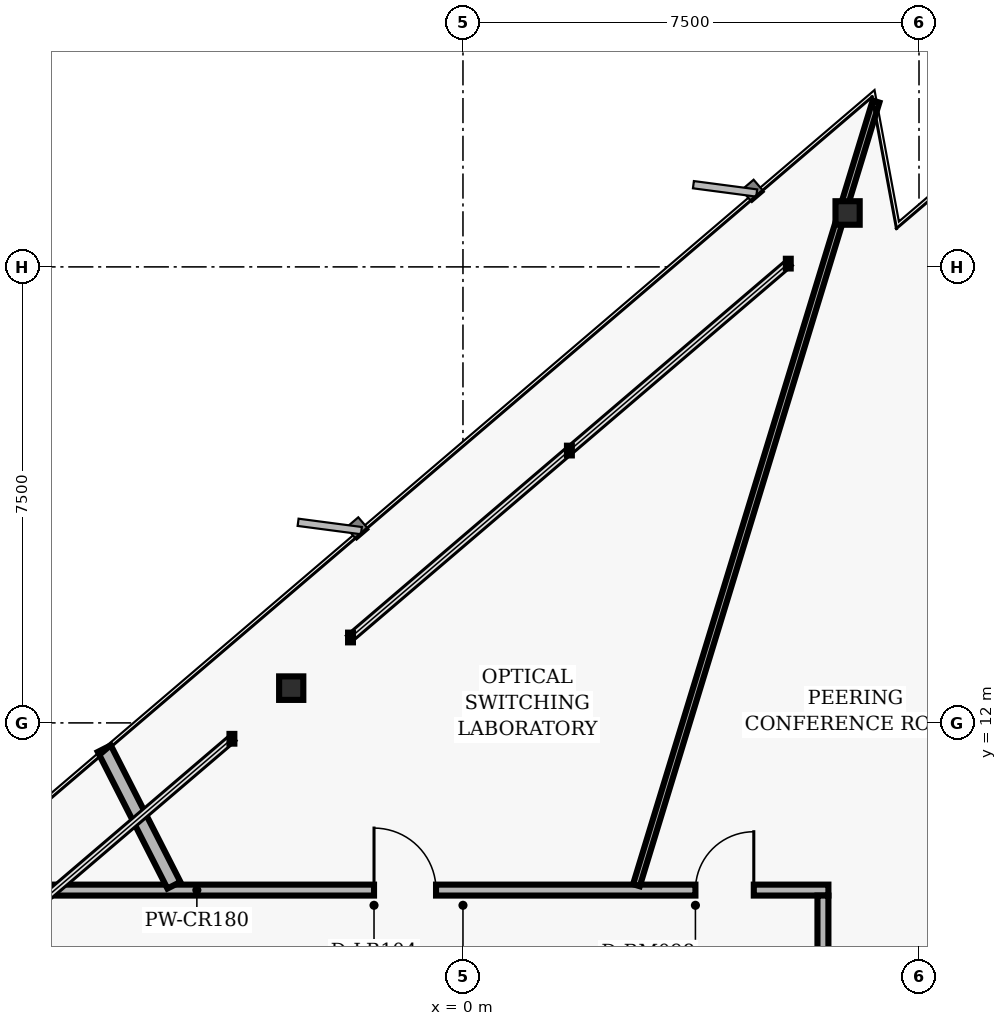
"""IFC4 building model, lengths in metres.
Left out: names, types, materials, properties, quantities, classifications, styles, units other than length and angle.
Written with IfcOpenShell. Run it as: python <this file> out.ifc"""

import sys

from ifc_helpers import new_model, si_unit, direction, frame, frame_2d, origin, origin_2d, place, context, subcontext, project, spatial, rectangle, i_section, extrude, element, fill, save


model = new_model("IFC4")
c1 = context("Model", 3, precision=1e-05, world=origin(), true_north=direction((0.0, 1.0)))
c2 = subcontext(c1, "Body", "Model", "MODEL_VIEW")
j1 = project(units=[si_unit("LENGTHUNIT", "METRE"), si_unit("PLANEANGLEUNIT", "RADIAN")], contexts=[c1])
p1 = place(None, origin())
s1 = spatial("IfcSite", under=j1, at=p1, CompositionType="ELEMENT")
p2 = place(p1, origin())
s2 = spatial("IfcBuilding", under=s1, at=p2, CompositionType="ELEMENT")
p3 = place(p2, frame((0.0, 0.0, 175.36)))
s3 = spatial("IfcBuildingStorey", under=s2, at=p3, CompositionType="ELEMENT", Elevation=175.36)
for number, where, z_axis, x_axis in (
    (1, (6.325, 20.387, 0.0), (0.0, 0.0, 1.0), (1.0, 0.0, 0.0)),
    (2, (-2.825, 12.572, 0.0), (0.0, 0.0, 1.0), (1.0, 0.0, 0.0)),
):
    element("IfcColumn", number, at=place(p3, frame(where, z_axis=z_axis, x_axis=x_axis)), inside=s3, PredefinedType="COLUMN", context=c2, shape_type="SweptSolid", body=[
        extrude(i_section(OverallWidth=0.398, OverallDepth=0.387, WebThickness=0.021, FlangeThickness=0.033, FilletRadius=0.018, at=origin_2d()), origin(), (0.0, 0.0, 1.0), 3.04),
    ])
p4 = place(p3, frame((-7.29, 9.25, 0.0), z_axis=(0.0, 0.0, 1.0), x_axis=(1.0, 0.0, 0.0)))
e3 = element("IfcWall", 3, at=p4, inside=s3, PredefinedType="PARTITIONING", context=c2, shape_type="SweptSolid", body=[
    extrude(rectangle(XDim=13.3, YDim=0.18, at=frame_2d((6.65, 0.0))), origin(), (0.0, 0.0, 1.0), 2.773),
])
p5 = place(p4, frame((11.113, 0.0, 0.0)))
e4 = element("IfcOpeningElement", 4, at=p5, cuts=e3, PredefinedType="OPENING", context=c2, shape_type="SweptSolid", body=[
    extrude(rectangle(XDim=0.96, YDim=2.02, at=frame_2d((0.48, 1.01))), frame((0.0, 0.1, 0.0), z_axis=(0.0, -1.0, 0.0), x_axis=(1.0, 0.0, 0.0)), (0.0, 0.0, 1.0), 0.2),
])
p6 = place(p4, frame((5.827, 0.0, 0.0)))
e5 = element("IfcOpeningElement", 5, at=p6, cuts=e3, PredefinedType="OPENING", context=c2, shape_type="SweptSolid", body=[
    extrude(rectangle(XDim=1.02, YDim=2.02, at=frame_2d((0.51, 1.01))), frame((0.0, 0.1, 0.0), z_axis=(0.0, -1.0, 0.0), x_axis=(1.0, 0.0, 0.0)), (0.0, 0.0, 1.0), 0.2),
])
p7 = place(p3, frame((5.92, 9.16, 0.0), z_axis=(0.0, 0.0, 1.0), x_axis=(0.0, -1.0, 0.0)))
e6 = element("IfcWall", 6, at=p7, inside=s3, PredefinedType="PARTITIONING", context=c2, shape_type="SweptSolid", body=[
    extrude(rectangle(XDim=1.8, YDim=0.18, at=frame_2d((0.9, 0.0))), origin(), (0.0, 0.0, 1.0), 2.253),
])
p8 = place(p3, frame((2.853, 9.33, 0.0), z_axis=(0.0, 0.0, 1.0), x_axis=(0.292365790083, 0.95630656423, 0.0)))
e7 = element("IfcWall", 7, at=p8, inside=s3, PredefinedType="MOVABLE", context=c2, shape_type="SweptSolid", body=[
    extrude(rectangle(XDim=13.479, YDim=0.115, at=frame_2d((6.739, 0.0))), origin(), (0.0, 0.0, 1.0), 2.253),
])
p9 = place(p3, frame((-4.754, 9.33, 0.0), z_axis=(0.0, 0.0, 1.0), x_axis=(-0.453977993214, 0.891012896471, 0.0)))
e8 = element("IfcWall", 8, at=p9, inside=s3, PredefinedType="PARTITIONING", context=c2, shape_type="SweptSolid", body=[
    extrude(rectangle(XDim=2.522, YDim=0.24, at=frame_2d((1.261, 0.0))), origin(), (0.0, 0.0, 1.0), 2.773),
])
p10 = place(p5, origin())
e9 = element("IfcDoor", 9, at=p10, inside=s3, OperationType="SINGLE_SWING_RIGHT", PredefinedType="DOOR", context=c2, shape_type="SweptSolid", body=[
    extrude(rectangle(XDim=0.96, YDim=2.02, at=frame_2d((0.48, 1.01))), frame((0.0, 0.025, 0.0), z_axis=(0.0, -1.0, 0.0), x_axis=(1.0, 0.0, 0.0)), (0.0, 0.0, 1.0), 0.05),
])
fill(e4, e9)
p11 = place(p6, origin())
e10 = element("IfcDoor", 10, at=p11, inside=s3, OperationType="SINGLE_SWING_LEFT", PredefinedType="DOOR", context=c2, shape_type="SweptSolid", body=[
    extrude(rectangle(XDim=1.02, YDim=2.02, at=frame_2d((0.51, 1.01))), frame((0.0, 0.025, 0.0), z_axis=(0.0, -1.0, 0.0), x_axis=(1.0, 0.0, 0.0)), (0.0, 0.0, 1.0), 0.05),
])
fill(e5, e10)
save(model, sys.argv[1])
